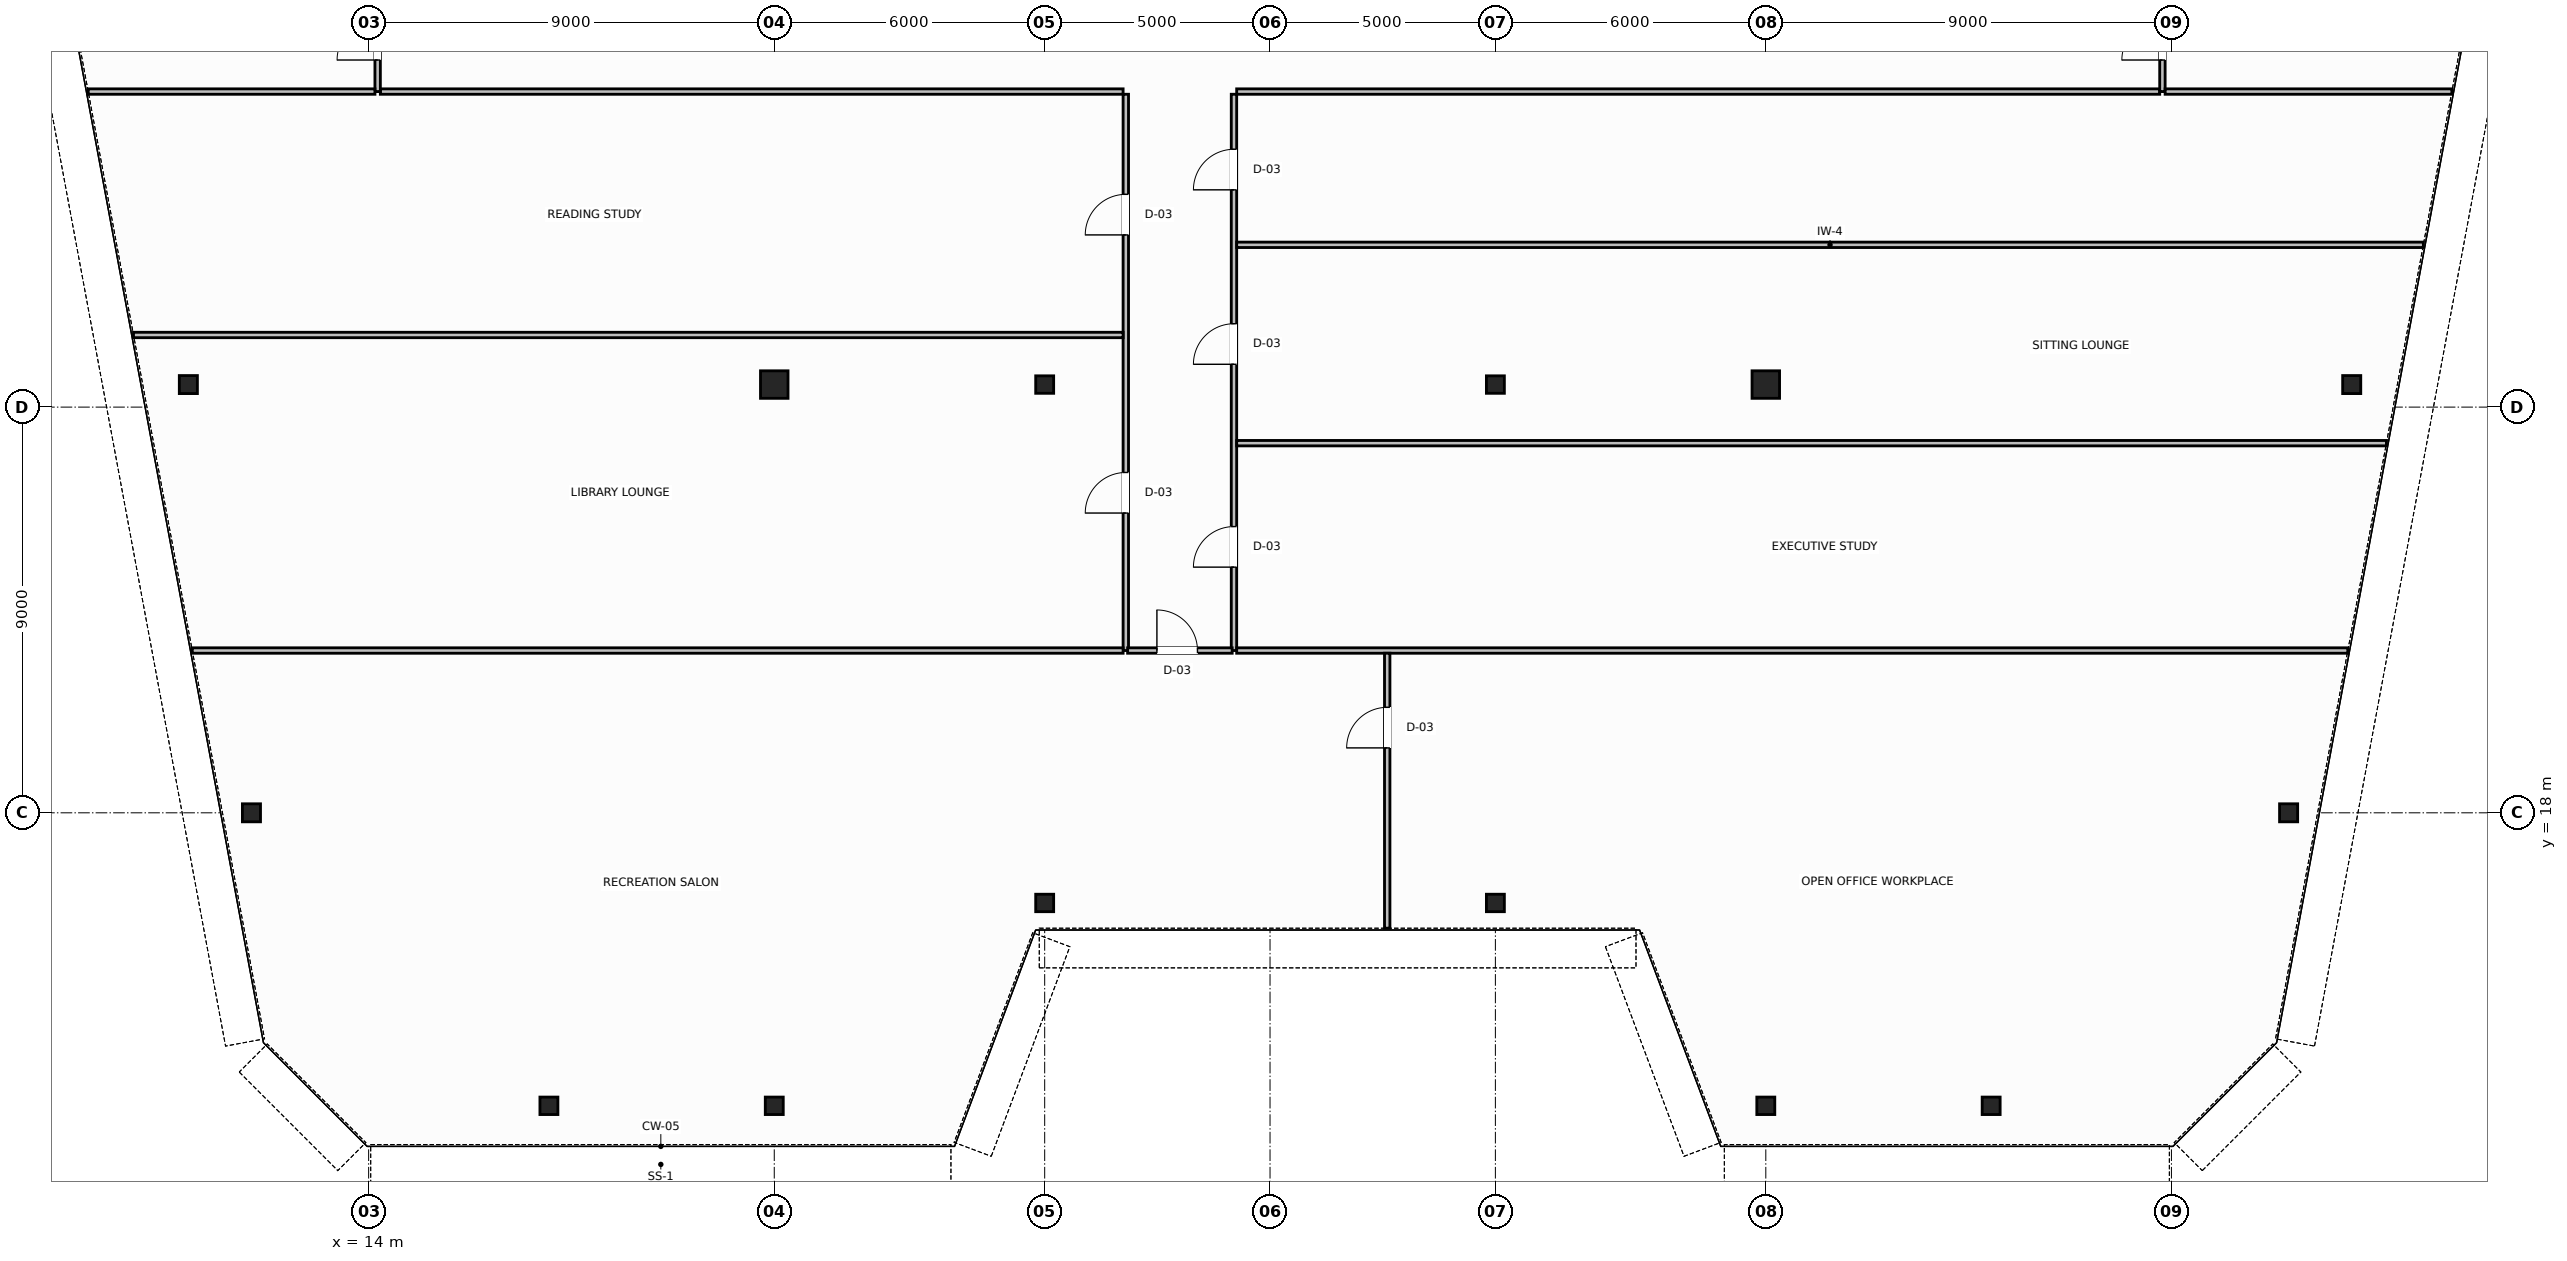
"""IFC4 building model, lengths in metres.
Left out: names, types, materials, properties, quantities, classifications, styles, units other than length and angle.
Written with IfcOpenShell. Run it as: python <this file> out.ifc"""

import sys

from ifc_helpers import new_model, si_unit, direction, frame, frame_2d, origin, origin_2d, place, context, subcontext, project, spatial, rectangle, hollow_circle, i_section, extrude, source, transform, mapped, element, fill, save


model = new_model("IFC4")
c1 = context("Model", 3, precision=1e-05, world=origin(), true_north=direction((0.0, 1.0)))
c2 = subcontext(c1, "Body", "Model", "MODEL_VIEW")
j1 = project(units=[si_unit("LENGTHUNIT", "METRE"), si_unit("PLANEANGLEUNIT", "RADIAN")], contexts=[c1])
p1 = place(None, origin())
s1 = spatial("IfcSite", under=j1, at=p1, CompositionType="ELEMENT")
p2 = place(p1, origin())
s2 = spatial("IfcBuilding", under=s1, at=p2, CompositionType="ELEMENT")
p3 = place(p2, frame((0.0, 0.0, 261.2)))
s3 = spatial("IfcBuildingStorey", under=s2, at=p3, CompositionType="ELEMENT", Elevation=261.2)
m1 = source(origin(), c2, "Body", "SweptSolid", [
    extrude(i_section(OverallWidth=0.401, OverallDepth=0.399, WebThickness=0.025, FlangeThickness=0.035, FilletRadius=0.015, at=origin_2d()), origin(), (0.0, 0.0, 1.0), 3.8),
])
for number, where, z_axis, x_axis in (
    (1, (10.0, 27.5, 0.0), (0.0, 0.0, 1.0), (1.0, 0.0, 0.0)),
    (2, (11.4, 18.0, 0.0), (0.0, 0.0, 1.0), (1.0, 0.0, 0.0)),
    (3, (58.0, 27.5, 0.0), (0.0, 0.0, 1.0), (1.0, 0.0, 0.0)),
    (4, (56.6, 18.0, 0.0), (0.0, 0.0, 1.0), (1.0, 0.0, 0.0)),
):
    element("IfcColumn", number, at=place(p3, frame(where, z_axis=z_axis, x_axis=x_axis)), inside=s3, PredefinedType="COLUMN", context=c2, shape_type="MappedRepresentation", body=[
        mapped(m1, transform((0.0, 0.0, 0.0), scale=1.0)),
    ])
m2 = source(origin(), c2, "Body", "SweptSolid", [
    extrude(hollow_circle(Radius=0.305, WallThickness=0.03, at=origin_2d()), origin(), (0.0, 0.0, 1.0), 3.8),
])
p4 = place(p3, frame((23.0, 27.5, 0.0), z_axis=(0.0, 0.0, 1.0), x_axis=(1.0, 0.0, 0.0)))
e5 = element("IfcColumn", 5, at=p4, inside=s3, PredefinedType="COLUMN", context=c2, shape_type="MappedRepresentation", body=[
    mapped(m2, transform((0.0, 0.0, 0.0), scale=1.0)),
])
m3 = source(origin(), c2, "Body", "SweptSolid", [
    extrude(i_section(OverallWidth=0.398, OverallDepth=0.387, WebThickness=0.021, FlangeThickness=0.029, FilletRadius=0.015, at=origin_2d()), origin(), (0.0, 0.0, 1.0), 3.8),
])
for number, where, z_axis, x_axis in (
    (6, (29.0, 27.5, 0.0), (0.0, 0.0, 1.0), (1.0, 0.0, 0.0)),
    (7, (39.0, 27.5, 0.0), (0.0, 0.0, 1.0), (1.0, 0.0, 0.0)),
):
    element("IfcColumn", number, at=place(p3, frame(where, z_axis=z_axis, x_axis=x_axis)), inside=s3, PredefinedType="COLUMN", context=c2, shape_type="MappedRepresentation", body=[
        mapped(m3, transform((0.0, 0.0, 0.0), scale=1.0)),
    ])
p5 = place(p3, frame((45.0, 27.5, 0.0), z_axis=(0.0, 0.0, 1.0), x_axis=(1.0, 0.0, 0.0)))
e8 = element("IfcColumn", 8, at=p5, inside=s3, PredefinedType="COLUMN", context=c2, shape_type="MappedRepresentation", body=[
    mapped(m2, transform((0.0, 0.0, 0.0), scale=1.0)),
])
for number, where, z_axis, x_axis in (
    (9, (18.0, 11.5, 0.0), (0.0, 0.0, 1.0), (1.0, 0.0, 0.0)),
    (10, (23.0, 11.5, 0.0), (0.0, 0.0, 1.0), (1.0, 0.0, 0.0)),
    (11, (29.0, 16.0, 0.0), (0.0, 0.0, 1.0), (1.0, 0.0, 0.0)),
    (12, (39.0, 16.0, 0.0), (0.0, 0.0, 1.0), (1.0, 0.0, 0.0)),
    (13, (45.0, 11.5, 0.0), (0.0, 0.0, 1.0), (1.0, 0.0, 0.0)),
    (14, (50.0, 11.5, 0.0), (0.0, 0.0, 1.0), (1.0, 0.0, 0.0)),
):
    element("IfcColumn", number, at=place(p3, frame(where, z_axis=z_axis, x_axis=x_axis)), inside=s3, PredefinedType="COLUMN", context=c2, shape_type="MappedRepresentation", body=[
        mapped(m3, transform((0.0, 0.0, 0.0), scale=1.0)),
    ])
p6 = place(p3, frame((14.26, 34.0, 0.0), z_axis=(0.0, 0.0, 1.0), x_axis=(1.0, 0.0, 0.0)))
e15 = element("IfcWall", 15, at=p6, inside=s3, PredefinedType="PARTITIONING", context=c2, shape_type="SweptSolid", body=[
    extrude(rectangle(XDim=16.48, YDim=0.12, at=frame_2d((8.24, 0.0))), origin(), (0.0, 0.0, 1.0), 3.58),
])
p7 = place(p3, frame((33.26, 34.0, 0.0), z_axis=(0.0, 0.0, 1.0), x_axis=(1.0, 0.0, 0.0)))
e16 = element("IfcWall", 16, at=p7, inside=s3, PredefinedType="PARTITIONING", context=c2, shape_type="SweptSolid", body=[
    extrude(rectangle(XDim=20.48, YDim=0.12, at=frame_2d((10.24, 0.0))), origin(), (0.0, 0.0, 1.0), 3.58),
])
p8 = place(p3, frame((14.2, 34.0, 0.0), z_axis=(0.0, 0.0, 1.0), x_axis=(0.0, 1.0, 0.0)))
e17 = element("IfcWall", 17, at=p8, inside=s3, PredefinedType="PARTITIONING", context=c2, shape_type="SweptSolid", body=[
    extrude(rectangle(XDim=2.44, YDim=0.12, at=frame_2d((1.22, 0.0))), origin(), (0.0, 0.0, 1.0), 3.58),
])
p9 = place(p8, frame((0.7, 0.0, 0.0)))
e18 = element("IfcOpeningElement", 18, at=p9, cuts=e17, PredefinedType="OPENING", context=c2, shape_type="SweptSolid", body=[
    extrude(rectangle(XDim=0.9, YDim=2.15, at=frame_2d((0.45, 1.075))), frame((0.0, 0.07, 0.0), z_axis=(0.0, -1.0, 0.0), x_axis=(1.0, 0.0, 0.0)), (0.0, 0.0, 1.0), 0.14),
])
p10 = place(p3, frame((53.8, 34.0, 0.0), z_axis=(0.0, 0.0, 1.0), x_axis=(0.0, 1.0, 0.0)))
e19 = element("IfcWall", 19, at=p10, inside=s3, PredefinedType="PARTITIONING", context=c2, shape_type="SweptSolid", body=[
    extrude(rectangle(XDim=2.44, YDim=0.12, at=frame_2d((1.22, 0.0))), origin(), (0.0, 0.0, 1.0), 3.58),
])
p11 = place(p10, frame((0.7, 0.0, 0.0)))
e20 = element("IfcOpeningElement", 20, at=p11, cuts=e19, PredefinedType="OPENING", context=c2, shape_type="SweptSolid", body=[
    extrude(rectangle(XDim=0.9, YDim=2.15, at=frame_2d((0.45, 1.075))), frame((0.0, 0.07, 0.0), z_axis=(0.0, -1.0, 0.0), x_axis=(1.0, 0.0, 0.0)), (0.0, 0.0, 1.0), 0.14),
])
p12 = place(p3, frame((30.8, 21.6, 0.0), z_axis=(0.0, 0.0, 1.0), x_axis=(0.0, 1.0, 0.0)))
e21 = element("IfcWall", 21, at=p12, inside=s3, PredefinedType="PARTITIONING", context=c2, shape_type="SweptSolid", body=[
    extrude(rectangle(XDim=12.34, YDim=0.12, at=frame_2d((6.17, 0.0))), origin(), (0.0, 0.0, 1.0), 3.58),
])
p13 = place(p12, frame((3.05, 0.0, 0.0)))
e22 = element("IfcOpeningElement", 22, at=p13, cuts=e21, PredefinedType="OPENING", context=c2, shape_type="SweptSolid", body=[
    extrude(rectangle(XDim=0.9, YDim=2.15, at=frame_2d((0.45, 1.075))), frame((0.0, 0.07, 0.0), z_axis=(0.0, -1.0, 0.0), x_axis=(1.0, 0.0, 0.0)), (0.0, 0.0, 1.0), 0.14),
])
p14 = place(p12, frame((9.22, 0.0, 0.0)))
e23 = element("IfcOpeningElement", 23, at=p14, cuts=e21, PredefinedType="OPENING", context=c2, shape_type="SweptSolid", body=[
    extrude(rectangle(XDim=0.9, YDim=2.15, at=frame_2d((0.45, 1.075))), frame((0.0, 0.07, 0.0), z_axis=(0.0, -1.0, 0.0), x_axis=(1.0, 0.0, 0.0)), (0.0, 0.0, 1.0), 0.14),
])
p15 = place(p3, frame((33.2, 21.6, 0.0), z_axis=(0.0, 0.0, 1.0), x_axis=(0.0, 1.0, 0.0)))
e24 = element("IfcWall", 24, at=p15, inside=s3, PredefinedType="PARTITIONING", context=c2, shape_type="SweptSolid", body=[
    extrude(rectangle(XDim=12.34, YDim=0.12, at=frame_2d((6.17, 0.0))), origin(), (0.0, 0.0, 1.0), 3.58),
])
p16 = place(p15, frame((1.85, 0.0, 0.0)))
e25 = element("IfcOpeningElement", 25, at=p16, cuts=e24, PredefinedType="OPENING", context=c2, shape_type="SweptSolid", body=[
    extrude(rectangle(XDim=0.9, YDim=2.15, at=frame_2d((0.45, 1.075))), frame((0.0, 0.07, 0.0), z_axis=(0.0, -1.0, 0.0), x_axis=(1.0, 0.0, 0.0)), (0.0, 0.0, 1.0), 0.14),
])
p17 = place(p15, frame((6.35, 0.0, 0.0)))
e26 = element("IfcOpeningElement", 26, at=p17, cuts=e24, PredefinedType="OPENING", context=c2, shape_type="SweptSolid", body=[
    extrude(rectangle(XDim=0.9, YDim=2.15, at=frame_2d((0.45, 1.075))), frame((0.0, 0.07, 0.0), z_axis=(0.0, -1.0, 0.0), x_axis=(1.0, 0.0, 0.0)), (0.0, 0.0, 1.0), 0.14),
])
p18 = place(p15, frame((10.22, 0.0, 0.0)))
e27 = element("IfcOpeningElement", 27, at=p18, cuts=e24, PredefinedType="OPENING", context=c2, shape_type="SweptSolid", body=[
    extrude(rectangle(XDim=0.9, YDim=2.15, at=frame_2d((0.45, 1.075))), frame((0.0, 0.07, 0.0), z_axis=(0.0, -1.0, 0.0), x_axis=(1.0, 0.0, 0.0)), (0.0, 0.0, 1.0), 0.14),
])
p19 = place(p3, frame((30.84, 21.6, 0.0), z_axis=(0.0, 0.0, 1.0), x_axis=(1.0, 0.0, 0.0)))
e28 = element("IfcWall", 28, at=p19, inside=s3, PredefinedType="PARTITIONING", context=c2, shape_type="SweptSolid", body=[
    extrude(rectangle(XDim=2.32, YDim=0.12, at=frame_2d((1.16, 0.0))), origin(), (0.0, 0.0, 1.0), 3.58),
])
p20 = place(p19, frame((0.65, 0.0, 0.0)))
e29 = element("IfcOpeningElement", 29, at=p20, cuts=e28, PredefinedType="OPENING", context=c2, shape_type="SweptSolid", body=[
    extrude(rectangle(XDim=0.9, YDim=2.15, at=frame_2d((0.45, 1.075))), frame((0.0, 0.07, 0.0), z_axis=(0.0, -1.0, 0.0), x_axis=(1.0, 0.0, 0.0)), (0.0, 0.0, 1.0), 0.14),
])
for number, where, z_axis, x_axis in (
    (30, (7.777, 34.0, 0.0), (0.0, 0.0, 1.0), (1.0, 0.0, 0.0)),
    (31, (53.86, 34.0, 0.0), (0.0, 0.0, 1.0), (1.0, 0.0, 0.0)),
):
    element("IfcWall", number, at=place(p3, frame(where, z_axis=z_axis, x_axis=x_axis)), inside=s3, PredefinedType="PARTITIONING", context=c2, shape_type="SweptSolid", body=[
        extrude(rectangle(XDim=6.363, YDim=0.12, at=frame_2d((3.181, 0.0))), origin(), (0.0, 0.0, 1.0), 3.58),
    ])
p21 = place(p3, frame((8.783, 28.6, 0.0), z_axis=(0.0, 0.0, 1.0), x_axis=(1.0, 0.0, 0.0)))
e32 = element("IfcWall", 32, at=p21, inside=s3, PredefinedType="PARTITIONING", context=c2, shape_type="SweptSolid", body=[
    extrude(rectangle(XDim=21.957, YDim=0.12, at=frame_2d((10.979, 0.0))), origin(), (0.0, 0.0, 1.0), 3.58),
])
p22 = place(p3, frame((33.26, 26.2, 0.0), z_axis=(0.0, 0.0, 1.0), x_axis=(1.0, 0.0, 0.0)))
e33 = element("IfcWall", 33, at=p22, inside=s3, PredefinedType="PARTITIONING", context=c2, shape_type="SweptSolid", body=[
    extrude(rectangle(XDim=25.51, YDim=0.12, at=frame_2d((12.755, 0.0))), origin(), (0.0, 0.0, 1.0), 3.58),
])
p23 = place(p3, frame((33.26, 30.6, 0.0), z_axis=(0.0, 0.0, 1.0), x_axis=(1.0, 0.0, 0.0)))
e34 = element("IfcWall", 34, at=p23, inside=s3, PredefinedType="PARTITIONING", context=c2, shape_type="SweptSolid", body=[
    extrude(rectangle(XDim=26.33, YDim=0.12, at=frame_2d((13.165, 0.0))), origin(), (0.0, 0.0, 1.0), 3.58),
])
p24 = place(p3, frame((10.086, 21.6, 0.0), z_axis=(0.0, 0.0, 1.0), x_axis=(1.0, 0.0, 0.0)))
e35 = element("IfcWall", 35, at=p24, inside=s3, PredefinedType="PARTITIONING", context=c2, shape_type="SweptSolid", body=[
    extrude(rectangle(XDim=20.654, YDim=0.12, at=frame_2d((10.327, 0.0))), origin(), (0.0, 0.0, 1.0), 3.58),
])
p25 = place(p3, frame((33.26, 21.6, 0.0), z_axis=(0.0, 0.0, 1.0), x_axis=(1.0, 0.0, 0.0)))
e36 = element("IfcWall", 36, at=p25, inside=s3, PredefinedType="PARTITIONING", context=c2, shape_type="SweptSolid", body=[
    extrude(rectangle(XDim=24.654, YDim=0.12, at=frame_2d((12.327, 0.0))), origin(), (0.0, 0.0, 1.0), 3.58),
])
p26 = place(p3, frame((36.6, 15.44, 0.0), z_axis=(0.0, 0.0, 1.0), x_axis=(0.0, 1.0, 0.0)))
e37 = element("IfcWall", 37, at=p26, inside=s3, PredefinedType="PARTITIONING", context=c2, shape_type="SweptSolid", body=[
    extrude(rectangle(XDim=6.1, YDim=0.12, at=frame_2d((3.05, 0.0))), origin(), (0.0, 0.0, 1.0), 3.58),
])
p27 = place(p26, frame((4.0, 0.0, 0.0)))
e38 = element("IfcOpeningElement", 38, at=p27, cuts=e37, PredefinedType="OPENING", context=c2, shape_type="SweptSolid", body=[
    extrude(rectangle(XDim=0.9, YDim=2.15, at=frame_2d((0.45, 1.075))), frame((0.0, 0.07, 0.0), z_axis=(0.0, -1.0, 0.0), x_axis=(1.0, 0.0, 0.0)), (0.0, 0.0, 1.0), 0.14),
])
m4 = source(origin(), c2, "Body", "SweptSolid", [
    extrude(rectangle(XDim=0.9, YDim=2.15, at=frame_2d((0.45, 1.075))), frame((0.0, 0.025, 0.0), z_axis=(0.0, -1.0, 0.0), x_axis=(1.0, 0.0, 0.0)), (0.0, 0.0, 1.0), 0.05),
])
p28 = place(p9, origin())
e39 = element("IfcDoor", 39, at=p28, inside=s3, OperationType="SINGLE_SWING_LEFT", PredefinedType="DOOR", context=c2, shape_type="MappedRepresentation", body=[
    mapped(m4, transform((0.0, 0.0, 0.0), scale=1.0)),
])
fill(e18, e39)
p29 = place(p11, origin())
e40 = element("IfcDoor", 40, at=p29, inside=s3, OperationType="SINGLE_SWING_RIGHT", PredefinedType="DOOR", context=c2, shape_type="MappedRepresentation", body=[
    mapped(m4, transform((0.0, 0.0, 0.0), scale=1.0)),
])
fill(e20, e40)
p30 = place(p13, origin())
e41 = element("IfcDoor", 41, at=p30, inside=s3, OperationType="SINGLE_SWING_LEFT", PredefinedType="DOOR", context=c2, shape_type="MappedRepresentation", body=[
    mapped(m4, transform((0.0, 0.0, 0.0), scale=1.0)),
])
fill(e22, e41)
p31 = place(p14, origin())
e42 = element("IfcDoor", 42, at=p31, inside=s3, OperationType="SINGLE_SWING_RIGHT", PredefinedType="DOOR", context=c2, shape_type="MappedRepresentation", body=[
    mapped(m4, transform((0.0, 0.0, 0.0), scale=1.0)),
])
fill(e23, e42)
p32 = place(p16, origin())
e43 = element("IfcDoor", 43, at=p32, inside=s3, OperationType="SINGLE_SWING_RIGHT", PredefinedType="DOOR", context=c2, shape_type="MappedRepresentation", body=[
    mapped(m4, transform((0.0, 0.0, 0.0), scale=1.0)),
])
fill(e25, e43)
p33 = place(p17, origin())
e44 = element("IfcDoor", 44, at=p33, inside=s3, OperationType="SINGLE_SWING_LEFT", PredefinedType="DOOR", context=c2, shape_type="MappedRepresentation", body=[
    mapped(m4, transform((0.0, 0.0, 0.0), scale=1.0)),
])
fill(e26, e44)
p34 = place(p18, origin())
e45 = element("IfcDoor", 45, at=p34, inside=s3, OperationType="SINGLE_SWING_RIGHT", PredefinedType="DOOR", context=c2, shape_type="MappedRepresentation", body=[
    mapped(m4, transform((0.0, 0.0, 0.0), scale=1.0)),
])
fill(e27, e45)
p35 = place(p20, origin())
e46 = element("IfcDoor", 46, at=p35, inside=s3, OperationType="SINGLE_SWING_LEFT", PredefinedType="DOOR", context=c2, shape_type="MappedRepresentation", body=[
    mapped(m4, transform((0.0, 0.0, 0.0), scale=1.0)),
])
fill(e29, e46)
p36 = place(p27, origin())
e47 = element("IfcDoor", 47, at=p36, inside=s3, OperationType="SINGLE_SWING_RIGHT", PredefinedType="DOOR", context=c2, shape_type="MappedRepresentation", body=[
    mapped(m4, transform((0.0, 0.0, 0.0), scale=1.0)),
])
fill(e38, e47)
save(model, sys.argv[1])
